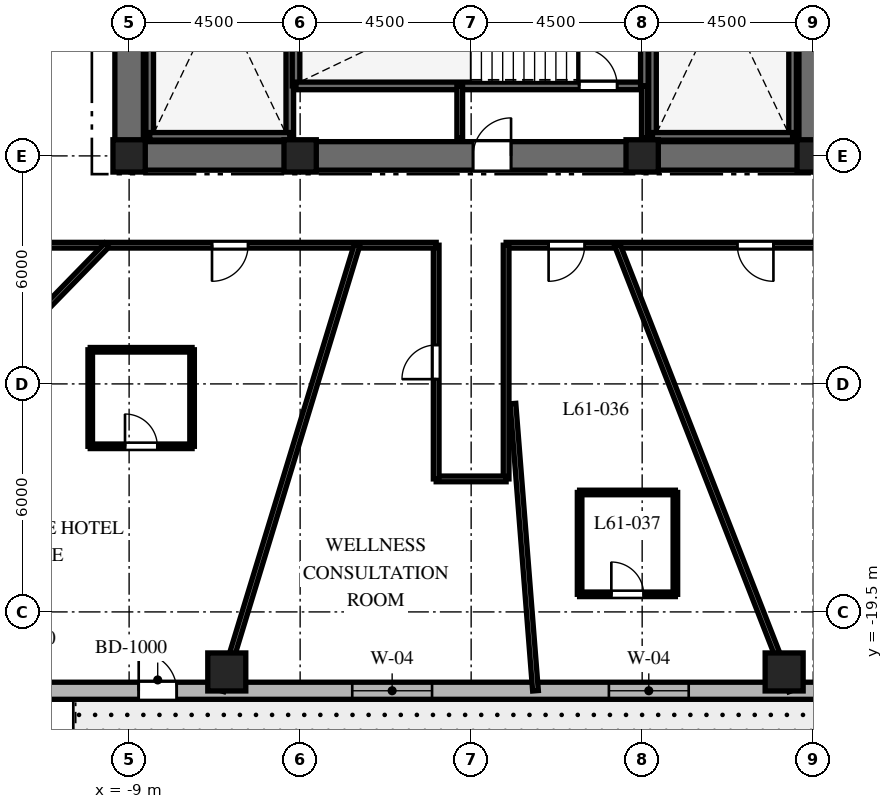
"""IFC4 building model, lengths in metres.
Left out: names, types, materials, properties, quantities, classifications, styles, units other than length and angle.
Written with IfcOpenShell. Run it as: python <this file> out.ifc"""

import sys

from ifc_helpers import new_model, si_unit, direction, frame, frame_2d, origin, origin_2d, place, context, subcontext, project, spatial, rectangle, extrude, element, fill, save


model = new_model("IFC4")
c1 = context("Model", 3, precision=1e-05, world=origin(), true_north=direction((0.0, 1.0)))
c2 = subcontext(c1, "Body", "Model", "MODEL_VIEW")
j1 = project(units=[si_unit("LENGTHUNIT", "METRE"), si_unit("PLANEANGLEUNIT", "RADIAN")], contexts=[c1])
p1 = place(None, origin())
s1 = spatial("IfcSite", under=j1, at=p1, CompositionType="ELEMENT")
p2 = place(p1, origin())
s2 = spatial("IfcBuilding", under=s1, at=p2, CompositionType="ELEMENT")
p3 = place(p2, frame((0.0, 0.0, 244.5)))
s3 = spatial("IfcBuildingStorey", under=s2, at=p3, CompositionType="ELEMENT", Elevation=244.5)
p4 = place(p3, frame((-9.375, -7.5, 0.0), z_axis=(0.0, 0.0, 1.0), x_axis=(1.0, 0.0, 0.0)))
e1 = element("IfcWall", 1, at=p4, inside=s3, PredefinedType="SHEAR", context=c2, shape_type="SweptSolid", body=[
    extrude(rectangle(XDim=18.75, YDim=0.75, at=frame_2d((9.375, 0.0))), origin(), (0.0, 0.0, 1.0), 3.8),
])
p5 = place(p4, frame((9.425, 0.0, 0.0)))
e2 = element("IfcOpeningElement", 2, at=p5, cuts=e1, PredefinedType="OPENING", context=c2, shape_type="SweptSolid", body=[
    extrude(rectangle(XDim=1.0, YDim=2.15, at=frame_2d((0.5, 1.075))), frame((0.0, 0.385, 0.0), z_axis=(0.0, -1.0, 0.0), x_axis=(1.0, 0.0, 0.0)), (0.0, 0.0, 1.0), 0.77),
])
p6 = place(p3, frame((-9.0, -7.125, 0.0), z_axis=(0.0, 0.0, 1.0), x_axis=(0.0, 1.0, 0.0)))
e3 = element("IfcWall", 3, at=p6, inside=s3, PredefinedType="SHEAR", context=c2, shape_type="SweptSolid", body=[
    extrude(rectangle(XDim=14.25, YDim=0.75, at=frame_2d((7.125, 0.0))), origin(), (0.0, 0.0, 1.0), 3.8),
])
p7 = place(p6, frame((10.25, 0.0, 0.0)))
e4 = element("IfcOpeningElement", 4, at=p7, cuts=e3, PredefinedType="OPENING", context=c2, shape_type="SweptSolid", body=[
    extrude(rectangle(XDim=1.05, YDim=2.15, at=frame_2d((0.525, 1.075))), frame((0.0, 0.385, 0.0), z_axis=(0.0, -1.0, 0.0), x_axis=(1.0, 0.0, 0.0)), (0.0, 0.0, 1.0), 0.77),
])
p8 = place(p3, frame((9.0, -7.125, 0.0), z_axis=(0.0, 0.0, 1.0), x_axis=(0.0, 1.0, 0.0)))
e5 = element("IfcWall", 5, at=p8, inside=s3, PredefinedType="SHEAR", context=c2, shape_type="SweptSolid", body=[
    extrude(rectangle(XDim=14.25, YDim=0.75, at=frame_2d((7.125, 0.0))), origin(), (0.0, 0.0, 1.0), 3.8),
])
p9 = place(p8, frame((10.25, 0.0, 0.0)))
e6 = element("IfcOpeningElement", 6, at=p9, cuts=e5, PredefinedType="OPENING", context=c2, shape_type="SweptSolid", body=[
    extrude(rectangle(XDim=1.05, YDim=2.15, at=frame_2d((0.525, 1.075))), frame((0.0, 0.385, 0.0), z_axis=(0.0, -1.0, 0.0), x_axis=(1.0, 0.0, 0.0)), (0.0, 0.0, 1.0), 0.77),
])
for number, where, z_axis, x_axis in (
    (7, (-8.458, -6.985, 0.0), (0.0, 0.0, 1.0), (0.0, 1.0, 0.0)),
    (8, (-4.772, -6.985, 0.0), (0.0, 0.0, 1.0), (0.0, 1.0, 0.0)),
):
    element("IfcWall", number, at=place(p3, frame(where, z_axis=z_axis, x_axis=x_axis)), inside=s3, PredefinedType="SHEAR", context=c2, shape_type="SweptSolid", body=[
        extrude(rectangle(XDim=9.143, YDim=0.2, at=frame_2d((4.572, 0.0))), origin(), (0.0, 0.0, 1.0), 3.8),
    ])
p10 = place(p3, frame((-8.458, -6.985, 0.0), z_axis=(0.0, 0.0, 1.0), x_axis=(1.0, 0.0, 0.0)))
e9 = element("IfcWall", 9, at=p10, inside=s3, PredefinedType="SHEAR", context=c2, shape_type="SweptSolid", body=[
    extrude(rectangle(XDim=3.686, YDim=0.2, at=frame_2d((1.843, 0.0))), origin(), (0.0, 0.0, 1.0), 3.8),
])
for number, where, z_axis, x_axis in (
    (10, (4.772, -6.985, 0.0), (0.0, 0.0, 1.0), (0.0, 1.0, 0.0)),
    (11, (8.458, -6.985, 0.0), (0.0, 0.0, 1.0), (0.0, 1.0, 0.0)),
):
    element("IfcWall", number, at=place(p3, frame(where, z_axis=z_axis, x_axis=x_axis)), inside=s3, PredefinedType="SHEAR", context=c2, shape_type="SweptSolid", body=[
        extrude(rectangle(XDim=9.143, YDim=0.2, at=frame_2d((4.572, 0.0))), origin(), (0.0, 0.0, 1.0), 3.8),
    ])
for number, where, z_axis, x_axis in (
    (12, (4.772, -6.985, 0.0), (0.0, 0.0, 1.0), (1.0, 0.0, 0.0)),
    (13, (-4.608, -5.658, 0.0), (0.0, 0.0, 1.0), (0.0, 1.0, 0.0)),
):
    element("IfcWall", number, at=place(p3, frame(where, z_axis=z_axis, x_axis=x_axis)), inside=s3, PredefinedType="SHEAR", context=c2, shape_type="SweptSolid", body=[
        extrude(rectangle(XDim=3.686, YDim=0.2, at=frame_2d((1.843, 0.0))), origin(), (0.0, 0.0, 1.0), 3.8),
    ])
p11 = place(p3, frame((-4.608, -5.658, 0.0), z_axis=(0.0, 0.0, 1.0), x_axis=(1.0, 0.0, 0.0)))
e14 = element("IfcWall", 14, at=p11, inside=s3, PredefinedType="SHEAR", context=c2, shape_type="SweptSolid", body=[
    extrude(rectangle(XDim=9.166, YDim=0.2, at=frame_2d((4.583, 0.0))), origin(), (0.0, 0.0, 1.0), 3.8),
])
p12 = place(p11, frame((7.45, 0.0, 0.0)))
e15 = element("IfcOpeningElement", 15, at=p12, cuts=e14, PredefinedType="OPENING", context=c2, shape_type="SweptSolid", body=[
    extrude(rectangle(XDim=1.0, YDim=2.15, at=frame_2d((0.5, 1.075))), frame((0.0, 0.11, 0.0), z_axis=(0.0, -1.0, 0.0), x_axis=(1.0, 0.0, 0.0)), (0.0, 0.0, 1.0), 0.22),
])
p13 = place(p3, frame((4.558, -5.658, 0.0), z_axis=(0.0, 0.0, 1.0), x_axis=(0.0, 1.0, 0.0)))
e16 = element("IfcWall", 16, at=p13, inside=s3, PredefinedType="SHEAR", context=c2, shape_type="SweptSolid", body=[
    extrude(rectangle(XDim=3.686, YDim=0.2, at=frame_2d((1.843, 0.0))), origin(), (0.0, 0.0, 1.0), 3.8),
])
for number, where, z_axis, x_axis in (
    (17, (-9.0, -7.5, 0.0), (0.0, 0.0, 1.0), (1.0, 0.0, 0.0)),
    (18, (-4.5, -7.5, 0.0), (0.0, 0.0, 1.0), (1.0, 0.0, 0.0)),
    (19, (4.5, -7.5, 0.0), (0.0, 0.0, 1.0), (1.0, 0.0, 0.0)),
    (20, (9.0, -7.5, 0.0), (0.0, 0.0, 1.0), (1.0, 0.0, 0.0)),
):
    element("IfcColumn", number, at=place(p3, frame(where, z_axis=z_axis, x_axis=x_axis)), inside=s3, PredefinedType="COLUMN", context=c2, shape_type="SweptSolid", body=[
        extrude(rectangle(XDim=0.85, YDim=0.85, at=origin_2d()), origin(), (0.0, 0.0, 1.0), 3.8),
    ])
for number, where, z_axis, x_axis in (
    (21, (-6.43, -21.08, 0.0), (0.0, 0.0, 1.0), (1.0, 0.0, 0.0)),
    (22, (8.236, -21.08, 0.0), (0.0, 0.0, 1.0), (1.0, 0.0, 0.0)),
):
    element("IfcColumn", number, at=place(p3, frame(where, z_axis=z_axis, x_axis=x_axis)), inside=s3, PredefinedType="COLUMN", context=c2, shape_type="SweptSolid", body=[
        extrude(rectangle(XDim=1.0, YDim=1.0, at=origin_2d()), origin(), (0.0, 0.0, 1.0), 3.8),
    ])
p14 = place(p3, frame((-11.298, -21.575, 0.0), z_axis=(0.0, 0.0, 1.0), x_axis=(1.0, 0.0, 0.0)))
e23 = element("IfcWall", 23, at=p14, inside=s3, PredefinedType="SOLIDWALL", context=c2, shape_type="SweptSolid", body=[
    extrude(rectangle(XDim=24.399, YDim=0.45, at=frame_2d((12.2, 0.0))), origin(), (0.0, 0.0, 1.0), 3.5),
])
p15 = place(p14, frame((2.55, 0.0, 0.0)))
e24 = element("IfcOpeningElement", 24, at=p15, cuts=e23, PredefinedType="OPENING", context=c2, shape_type="SweptSolid", body=[
    extrude(rectangle(XDim=1.0, YDim=2.15, at=frame_2d((0.5, 1.075))), frame((0.0, 0.235, 0.0), z_axis=(0.0, -1.0, 0.0), x_axis=(1.0, 0.0, 0.0)), (0.0, 0.0, 1.0), 0.47),
])
p16 = place(p14, frame((8.169, 0.0, 0.8)))
e25 = element("IfcOpeningElement", 25, at=p16, cuts=e23, PredefinedType="OPENING", context=c2, shape_type="SweptSolid", body=[
    extrude(rectangle(XDim=2.1, YDim=1.85, at=frame_2d((1.05, 0.925))), frame((0.0, 0.235, 0.0), z_axis=(0.0, -1.0, 0.0), x_axis=(1.0, 0.0, 0.0)), (0.0, 0.0, 1.0), 0.47),
])
p17 = place(p14, frame((14.922, 0.0, 0.8)))
e26 = element("IfcOpeningElement", 26, at=p17, cuts=e23, PredefinedType="OPENING", context=c2, shape_type="SweptSolid", body=[
    extrude(rectangle(XDim=2.1, YDim=1.85, at=frame_2d((1.05, 0.925))), frame((0.0, 0.235, 0.0), z_axis=(0.0, -1.0, 0.0), x_axis=(1.0, 0.0, 0.0)), (0.0, 0.0, 1.0), 0.47),
])
p18 = place(p14, frame((20.996, 0.0, 0.8)))
e27 = element("IfcOpeningElement", 27, at=p18, cuts=e23, PredefinedType="OPENING", context=c2, shape_type="SweptSolid", body=[
    extrude(rectangle(XDim=2.1, YDim=1.85, at=frame_2d((1.05, 0.925))), frame((0.0, 0.235, 0.0), z_axis=(0.0, -1.0, 0.0), x_axis=(1.0, 0.0, 0.0)), (0.0, 0.0, 1.0), 0.47),
])
for number, where, z_axis, x_axis in (
    (28, (-0.3, -7.02, 0.0), (0.0, 0.0, 1.0), (0.0, 1.0, 0.0)),
    (29, (4.558, -7.02, 0.0), (0.0, 0.0, 1.0), (0.0, 1.0, 0.0)),
):
    element("IfcWall", number, at=place(p3, frame(where, z_axis=z_axis, x_axis=x_axis)), inside=s3, PredefinedType="PARTITIONING", context=c2, shape_type="SweptSolid", body=[
        extrude(rectangle(XDim=1.362, YDim=0.15, at=frame_2d((0.681, 0.0))), origin(), (0.0, 0.0, 1.0), 3.5),
    ])
p19 = place(p3, frame((11.35, -9.85, 0.0), z_axis=(0.0, 0.0, 1.0), x_axis=(-1.0, 0.0, 0.0)))
e30 = element("IfcWall", 30, at=p19, inside=s3, PredefinedType="PARTITIONING", context=c2, shape_type="SweptSolid", body=[
    extrude(rectangle(XDim=10.43, YDim=0.15, at=frame_2d((5.215, 0.0))), origin(), (0.0, 0.0, 1.0), 2.99),
])
p20 = place(p19, frame((8.362, 0.0, 0.0)))
e31 = element("IfcOpeningElement", 31, at=p20, cuts=e30, PredefinedType="OPENING", context=c2, shape_type="SweptSolid", body=[
    extrude(rectangle(XDim=0.95, YDim=2.03, at=frame_2d((0.475, 1.015))), frame((0.0, 0.085, 0.0), z_axis=(0.0, -1.0, 0.0), x_axis=(1.0, 0.0, 0.0)), (0.0, 0.0, 1.0), 0.17),
])
p21 = place(p19, frame((3.396, 0.0, 0.0)))
e32 = element("IfcOpeningElement", 32, at=p21, cuts=e30, PredefinedType="OPENING", context=c2, shape_type="SweptSolid", body=[
    extrude(rectangle(XDim=0.95, YDim=2.03, at=frame_2d((0.475, 1.015))), frame((0.0, 0.085, 0.0), z_axis=(0.0, -1.0, 0.0), x_axis=(1.0, 0.0, 0.0)), (0.0, 0.0, 1.0), 0.17),
])
p22 = place(p3, frame((0.92, -9.85, 0.0), z_axis=(0.0, 0.0, 1.0), x_axis=(0.0, -1.0, 0.0)))
e33 = element("IfcWall", 33, at=p22, inside=s3, PredefinedType="PARTITIONING", context=c2, shape_type="SweptSolid", body=[
    extrude(rectangle(XDim=6.15, YDim=0.15, at=frame_2d((3.075, 0.0))), origin(), (0.0, 0.0, 1.0), 3.027),
])
p23 = place(p3, frame((0.92, -16.0, 0.0), z_axis=(0.0, 0.0, 1.0), x_axis=(-1.0, 0.0, 0.0)))
e34 = element("IfcWall", 34, at=p23, inside=s3, PredefinedType="PARTITIONING", context=c2, shape_type="SweptSolid", body=[
    extrude(rectangle(XDim=1.84, YDim=0.15, at=frame_2d((0.92, 0.0))), origin(), (0.0, 0.0, 1.0), 3.5),
])
p24 = place(p3, frame((-0.92, -16.0, 0.0), z_axis=(0.0, 0.0, 1.0), x_axis=(0.0, 1.0, 0.0)))
e35 = element("IfcWall", 35, at=p24, inside=s3, PredefinedType="PARTITIONING", context=c2, shape_type="SweptSolid", body=[
    extrude(rectangle(XDim=6.15, YDim=0.15, at=frame_2d((3.075, 0.0))), origin(), (0.0, 0.0, 1.0), 3.027),
])
p25 = place(p24, frame((2.625, 0.0, 0.0)))
e36 = element("IfcOpeningElement", 36, at=p25, cuts=e35, PredefinedType="OPENING", context=c2, shape_type="SweptSolid", body=[
    extrude(rectangle(XDim=0.9, YDim=2.03, at=frame_2d((0.45, 1.015))), frame((0.0, 0.085, 0.0), z_axis=(0.0, -1.0, 0.0), x_axis=(1.0, 0.0, 0.0)), (0.0, 0.0, 1.0), 0.17),
])
p26 = place(p3, frame((-0.92, -9.85, 0.0), z_axis=(0.0, 0.0, 1.0), x_axis=(-1.0, 0.0, 0.0)))
e37 = element("IfcWall", 37, at=p26, inside=s3, PredefinedType="PARTITIONING", context=c2, shape_type="SweptSolid", body=[
    extrude(rectangle(XDim=10.43, YDim=0.15, at=frame_2d((5.215, 0.0))), origin(), (0.0, 0.0, 1.0), 2.99),
])
p27 = place(p26, frame((4.949, 0.0, 0.0)))
e38 = element("IfcOpeningElement", 38, at=p27, cuts=e37, PredefinedType="OPENING", context=c2, shape_type="SweptSolid", body=[
    extrude(rectangle(XDim=0.95, YDim=2.03, at=frame_2d((0.475, 1.015))), frame((0.0, 0.085, 0.0), z_axis=(0.0, -1.0, 0.0), x_axis=(1.0, 0.0, 0.0)), (0.0, 0.0, 1.0), 0.17),
])
p28 = place(p3, frame((-9.588, -9.85, 0.0), z_axis=(0.0, 0.0, 1.0), x_axis=(-0.697519469595, -0.716565830567, 0.0)))
e39 = element("IfcWall", 39, at=p28, inside=s3, PredefinedType="PARTITIONING", context=c2, shape_type="SweptSolid", body=[
    extrude(rectangle(XDim=9.126, YDim=0.15, at=frame_2d((4.563, 0.0))), origin(), (0.0, 0.0, 1.0), 2.74),
])
p29 = place(p3, frame((-3.004, -9.85, 0.0), z_axis=(0.0, 0.0, 1.0), x_axis=(-0.291775760688, -0.956486751333, 0.0)))
e40 = element("IfcWall", 40, at=p29, inside=s3, PredefinedType="PARTITIONING", context=c2, shape_type="SweptSolid", body=[
    extrude(rectangle(XDim=12.258, YDim=0.15, at=frame_2d((6.129, 0.0))), origin(), (0.0, 0.0, 1.0), 2.74),
])
p30 = place(p3, frame((1.1, -14.018, 0.0), z_axis=(0.0, 0.0, 1.0), x_axis=(0.078228275349, -0.996935472804, 0.0)))
e41 = element("IfcWall", 41, at=p30, inside=s3, PredefinedType="PARTITIONING", context=c2, shape_type="SweptSolid", body=[
    extrude(rectangle(XDim=7.581, YDim=0.15, at=frame_2d((3.79, 0.0))), origin(), (0.0, 0.0, 1.0), 2.74),
])
p31 = place(p3, frame((3.848, -9.85, 0.0), z_axis=(0.0, 0.0, 1.0), x_axis=(0.363921778212, -0.931429513889, 0.0)))
e42 = element("IfcWall", 42, at=p31, inside=s3, PredefinedType="PARTITIONING", context=c2, shape_type="SweptSolid", body=[
    extrude(rectangle(XDim=12.588, YDim=0.15, at=frame_2d((6.294, 0.0))), origin(), (0.0, 0.0, 1.0), 2.74),
])
p32 = place(p3, frame((-10.023, -15.142, 0.0), z_axis=(0.0, 0.0, 1.0), x_axis=(1.0, 0.0, 0.0)))
e43 = element("IfcWall", 43, at=p32, inside=s3, PredefinedType="PARTITIONING", context=c2, shape_type="SweptSolid", body=[
    extrude(rectangle(XDim=2.68, YDim=0.12, at=frame_2d((1.34, 0.0))), origin(), (0.0, 0.0, 1.0), 3.073),
])
p33 = place(p32, frame((0.915, 0.0, 0.0)))
e44 = element("IfcOpeningElement", 44, at=p33, cuts=e43, PredefinedType="OPENING", context=c2, shape_type="SweptSolid", body=[
    extrude(rectangle(XDim=0.85, YDim=2.03, at=frame_2d((0.425, 1.015))), frame((0.0, 0.07, 0.0), z_axis=(0.0, -1.0, 0.0), x_axis=(1.0, 0.0, 0.0)), (0.0, 0.0, 1.0), 0.14),
])
p34 = place(p3, frame((-7.343, -15.142, 0.0), z_axis=(0.0, 0.0, 1.0), x_axis=(0.0, 1.0, 0.0)))
e45 = element("IfcWall", 45, at=p34, inside=s3, PredefinedType="PARTITIONING", context=c2, shape_type="SweptSolid", body=[
    extrude(rectangle(XDim=2.54, YDim=0.12, at=frame_2d((1.27, 0.0))), origin(), (0.0, 0.0, 1.0), 2.94),
])
p35 = place(p3, frame((-7.343, -12.602, 0.0), z_axis=(0.0, 0.0, 1.0), x_axis=(-1.0, 0.0, 0.0)))
e46 = element("IfcWall", 46, at=p35, inside=s3, PredefinedType="PARTITIONING", context=c2, shape_type="SweptSolid", body=[
    extrude(rectangle(XDim=2.68, YDim=0.12, at=frame_2d((1.34, 0.0))), origin(), (0.0, 0.0, 1.0), 2.94),
])
p36 = place(p3, frame((-10.023, -12.602, 0.0), z_axis=(0.0, 0.0, 1.0), x_axis=(0.0, -1.0, 0.0)))
e47 = element("IfcWall", 47, at=p36, inside=s3, PredefinedType="PARTITIONING", context=c2, shape_type="SweptSolid", body=[
    extrude(rectangle(XDim=2.54, YDim=0.12, at=frame_2d((1.27, 0.0))), origin(), (0.0, 0.0, 1.0), 3.073),
])
p37 = place(p3, frame((2.854, -19.037, 0.0), z_axis=(0.0, 0.0, 1.0), x_axis=(1.0, 0.0, 0.0)))
e48 = element("IfcWall", 48, at=p37, inside=s3, PredefinedType="PARTITIONING", context=c2, shape_type="SweptSolid", body=[
    extrude(rectangle(XDim=2.52, YDim=0.12, at=frame_2d((1.26, 0.0))), origin(), (0.0, 0.0, 1.0), 3.5),
])
p38 = place(p37, frame((0.835, 0.0, 0.0)))
e49 = element("IfcOpeningElement", 49, at=p38, cuts=e48, PredefinedType="OPENING", context=c2, shape_type="SweptSolid", body=[
    extrude(rectangle(XDim=0.85, YDim=2.03, at=frame_2d((0.425, 1.015))), frame((0.0, 0.07, 0.0), z_axis=(0.0, -1.0, 0.0), x_axis=(1.0, 0.0, 0.0)), (0.0, 0.0, 1.0), 0.14),
])
p39 = place(p3, frame((5.374, -19.037, 0.0), z_axis=(0.0, 0.0, 1.0), x_axis=(0.0, 1.0, 0.0)))
e50 = element("IfcWall", 50, at=p39, inside=s3, PredefinedType="PARTITIONING", context=c2, shape_type="SweptSolid", body=[
    extrude(rectangle(XDim=2.68, YDim=0.12, at=frame_2d((1.34, 0.0))), origin(), (0.0, 0.0, 1.0), 2.94),
])
p40 = place(p3, frame((5.374, -16.357, 0.0), z_axis=(0.0, 0.0, 1.0), x_axis=(-1.0, 0.0, 0.0)))
e51 = element("IfcWall", 51, at=p40, inside=s3, PredefinedType="PARTITIONING", context=c2, shape_type="SweptSolid", body=[
    extrude(rectangle(XDim=2.52, YDim=0.12, at=frame_2d((1.26, 0.0))), origin(), (0.0, 0.0, 1.0), 3.5),
])
p41 = place(p3, frame((2.854, -16.357, 0.0), z_axis=(0.0, 0.0, 1.0), x_axis=(0.0, -1.0, 0.0)))
e52 = element("IfcWall", 52, at=p41, inside=s3, PredefinedType="PARTITIONING", context=c2, shape_type="SweptSolid", body=[
    extrude(rectangle(XDim=2.68, YDim=0.12, at=frame_2d((1.34, 0.0))), origin(), (0.0, 0.0, 1.0), 2.94),
])
p42 = place(p15, origin())
e53 = element("IfcDoor", 53, at=p42, inside=s3, OperationType="SINGLE_SWING_LEFT", PredefinedType="DOOR", context=c2, shape_type="SweptSolid", body=[
    extrude(rectangle(XDim=1.0, YDim=2.15, at=frame_2d((0.5, 1.075))), frame((0.0, 0.025, 0.0), z_axis=(0.0, -1.0, 0.0), x_axis=(1.0, 0.0, 0.0)), (0.0, 0.0, 1.0), 0.05),
])
fill(e24, e53)
p43 = place(p16, origin())
e54 = element("IfcWindow", 54, at=p43, inside=s3, PartitioningType="SINGLE_PANEL", PredefinedType="WINDOW", context=c2, shape_type="SweptSolid", body=[
    extrude(rectangle(XDim=2.1, YDim=1.85, at=frame_2d((1.05, 0.925))), frame((0.0, 0.03, 0.0), z_axis=(0.0, -1.0, 0.0), x_axis=(1.0, 0.0, 0.0)), (0.0, 0.0, 1.0), 0.06),
])
fill(e25, e54)
p44 = place(p17, origin())
e55 = element("IfcWindow", 55, at=p44, inside=s3, PartitioningType="SINGLE_PANEL", PredefinedType="WINDOW", context=c2, shape_type="SweptSolid", body=[
    extrude(rectangle(XDim=2.1, YDim=1.85, at=frame_2d((1.05, 0.925))), frame((0.0, 0.03, 0.0), z_axis=(0.0, -1.0, 0.0), x_axis=(1.0, 0.0, 0.0)), (0.0, 0.0, 1.0), 0.06),
])
fill(e26, e55)
p45 = place(p12, origin())
e56 = element("IfcDoor", 56, at=p45, inside=s3, OperationType="SINGLE_SWING_LEFT", PredefinedType="DOOR", context=c2, shape_type="SweptSolid", body=[
    extrude(rectangle(XDim=1.0, YDim=2.15, at=frame_2d((0.5, 1.075))), frame((0.0, 0.025, 0.0), z_axis=(0.0, -1.0, 0.0), x_axis=(1.0, 0.0, 0.0)), (0.0, 0.0, 1.0), 0.05),
])
fill(e15, e56)
p46 = place(p5, origin())
e57 = element("IfcDoor", 57, at=p46, inside=s3, OperationType="SINGLE_SWING_RIGHT", PredefinedType="DOOR", context=c2, shape_type="SweptSolid", body=[
    extrude(rectangle(XDim=1.0, YDim=2.15, at=frame_2d((0.5, 1.075))), frame((0.0, 0.025, 0.0), z_axis=(0.0, -1.0, 0.0), x_axis=(1.0, 0.0, 0.0)), (0.0, 0.0, 1.0), 0.05),
])
fill(e2, e57)
p47 = place(p27, origin())
e58 = element("IfcDoor", 58, at=p47, inside=s3, OperationType="SINGLE_SWING_RIGHT", PredefinedType="DOOR", context=c2, shape_type="SweptSolid", body=[
    extrude(rectangle(XDim=0.95, YDim=2.03, at=frame_2d((0.475, 1.015))), frame((0.0, 0.025, 0.0), z_axis=(0.0, -1.0, 0.0), x_axis=(1.0, 0.0, 0.0)), (0.0, 0.0, 1.0), 0.05),
])
fill(e38, e58)
p48 = place(p33, origin())
e59 = element("IfcDoor", 59, at=p48, inside=s3, OperationType="SINGLE_SWING_LEFT", PredefinedType="DOOR", context=c2, shape_type="SweptSolid", body=[
    extrude(rectangle(XDim=0.85, YDim=2.03, at=frame_2d((0.425, 1.015))), frame((0.0, 0.025, 0.0), z_axis=(0.0, -1.0, 0.0), x_axis=(1.0, 0.0, 0.0)), (0.0, 0.0, 1.0), 0.05),
])
fill(e44, e59)
p49 = place(p25, origin())
e60 = element("IfcDoor", 60, at=p49, inside=s3, OperationType="SINGLE_SWING_LEFT", PredefinedType="DOOR", context=c2, shape_type="SweptSolid", body=[
    extrude(rectangle(XDim=0.9, YDim=2.03, at=frame_2d((0.45, 1.015))), frame((0.0, 0.025, 0.0), z_axis=(0.0, -1.0, 0.0), x_axis=(1.0, 0.0, 0.0)), (0.0, 0.0, 1.0), 0.05),
])
fill(e36, e60)
p50 = place(p20, origin())
e61 = element("IfcDoor", 61, at=p50, inside=s3, OperationType="SINGLE_SWING_RIGHT", PredefinedType="DOOR", context=c2, shape_type="SweptSolid", body=[
    extrude(rectangle(XDim=0.95, YDim=2.03, at=frame_2d((0.475, 1.015))), frame((0.0, 0.025, 0.0), z_axis=(0.0, -1.0, 0.0), x_axis=(1.0, 0.0, 0.0)), (0.0, 0.0, 1.0), 0.05),
])
fill(e31, e61)
p51 = place(p38, origin())
e62 = element("IfcDoor", 62, at=p51, inside=s3, OperationType="SINGLE_SWING_LEFT", PredefinedType="DOOR", context=c2, shape_type="SweptSolid", body=[
    extrude(rectangle(XDim=0.85, YDim=2.03, at=frame_2d((0.425, 1.015))), frame((0.0, 0.025, 0.0), z_axis=(0.0, -1.0, 0.0), x_axis=(1.0, 0.0, 0.0)), (0.0, 0.0, 1.0), 0.05),
])
fill(e49, e62)
p52 = place(p21, origin())
e63 = element("IfcDoor", 63, at=p52, inside=s3, OperationType="SINGLE_SWING_LEFT", PredefinedType="DOOR", context=c2, shape_type="SweptSolid", body=[
    extrude(rectangle(XDim=0.95, YDim=2.03, at=frame_2d((0.475, 1.015))), frame((0.0, 0.025, 0.0), z_axis=(0.0, -1.0, 0.0), x_axis=(1.0, 0.0, 0.0)), (0.0, 0.0, 1.0), 0.05),
])
fill(e32, e63)
save(model, sys.argv[1])
